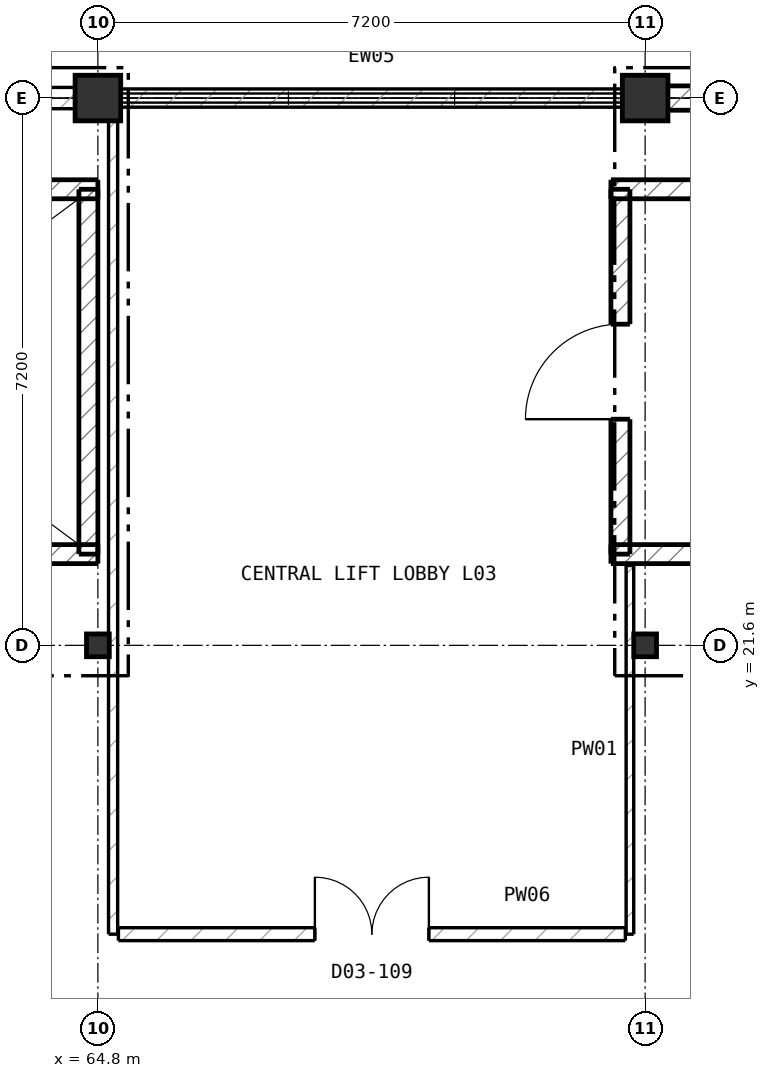
"""IFC4 building model, lengths in metres.
Left out: names, types, materials, properties, quantities, classifications, styles, units other than length and angle.
Written with IfcOpenShell. Run it as: python <this file> out.ifc"""

import sys

from ifc_helpers import new_model, si_unit, direction, frame, frame_2d, origin, origin_2d, place, context, subcontext, project, spatial, rectangle, hollow_rectangle, extrude, element, fill, save


model = new_model("IFC4")
c1 = context("Model", 3, precision=1e-05, world=origin(), true_north=direction((0.0, 1.0)))
c2 = subcontext(c1, "Body", "Model", "MODEL_VIEW")
j1 = project(units=[si_unit("LENGTHUNIT", "METRE"), si_unit("PLANEANGLEUNIT", "RADIAN")], contexts=[c1])
p1 = place(None, origin())
s1 = spatial("IfcSite", under=j1, at=p1, CompositionType="ELEMENT")
p2 = place(p1, origin())
s2 = spatial("IfcBuilding", under=s1, at=p2, CompositionType="ELEMENT")
p3 = place(p2, frame((0.0, 0.0, 16.0)))
s3 = spatial("IfcBuildingStorey", under=s2, at=p3, CompositionType="ELEMENT", Elevation=16.0)
p4 = place(p3, frame((64.8, 21.6, 0.0), z_axis=(0.0, 0.0, 1.0), x_axis=(1.0, 0.0, 0.0)))
e1 = element("IfcColumn", 1, at=p4, inside=s3, PredefinedType="COLUMN", context=c2, shape_type="SweptSolid", body=[
    extrude(hollow_rectangle(XDim=0.3, YDim=0.3, WallThickness=0.012, at=origin_2d()), origin(), (0.0, 0.0, 1.0), 4.4),
])
p5 = place(p3, frame((64.8, 28.8, 0.0), z_axis=(0.0, 0.0, 1.0), x_axis=(1.0, 0.0, 0.0)))
e2 = element("IfcColumn", 2, at=p5, inside=s3, PredefinedType="COLUMN", context=c2, shape_type="SweptSolid", body=[
    extrude(rectangle(XDim=0.6, YDim=0.6, at=origin_2d()), origin(), (0.0, 0.0, 1.0), 4.4),
])
p6 = place(p3, frame((72.0, 21.6, 0.0), z_axis=(0.0, 0.0, 1.0), x_axis=(1.0, 0.0, 0.0)))
e3 = element("IfcColumn", 3, at=p6, inside=s3, PredefinedType="COLUMN", context=c2, shape_type="SweptSolid", body=[
    extrude(hollow_rectangle(XDim=0.3, YDim=0.3, WallThickness=0.012, at=origin_2d()), origin(), (0.0, 0.0, 1.0), 4.4),
])
p7 = place(p3, frame((72.0, 28.8, 0.0), z_axis=(0.0, 0.0, 1.0), x_axis=(1.0, 0.0, 0.0)))
e4 = element("IfcColumn", 4, at=p7, inside=s3, PredefinedType="COLUMN", context=c2, shape_type="SweptSolid", body=[
    extrude(rectangle(XDim=0.6, YDim=0.6, at=origin_2d()), origin(), (0.0, 0.0, 1.0), 4.4),
])
p8 = place(p3, frame((57.885, 28.8, 0.0), z_axis=(0.0, 0.0, 1.0), x_axis=(1.0, 0.0, 0.0)))
e5 = element("IfcWall", 5, at=p8, inside=s3, PredefinedType="SOLIDWALL", context=c2, shape_type="SweptSolid", body=[
    extrude(rectangle(XDim=6.63, YDim=0.28, at=frame_2d((3.315, 0.0))), origin(), (0.0, 0.0, 1.0), 4.12),
])
p9 = place(p8, frame((1.715, 0.0, 2.15)))
e6 = element("IfcOpeningElement", 6, at=p9, cuts=e5, PredefinedType="OPENING", context=c2, shape_type="SweptSolid", body=[
    extrude(rectangle(XDim=3.2, YDim=1.2, at=frame_2d((1.6, 0.6))), frame((0.0, 0.15, 0.0), z_axis=(0.0, -1.0, 0.0), x_axis=(1.0, 0.0, 0.0)), (0.0, 0.0, 1.0), 0.3),
])
p10 = place(p3, frame((65.085, 28.8, 0.0), z_axis=(0.0, 0.0, 1.0), x_axis=(1.0, 0.0, 0.0)))
e7 = element("IfcWall", 7, at=p10, inside=s3, PredefinedType="SOLIDWALL", context=c2, shape_type="SweptSolid", body=[
    extrude(rectangle(XDim=6.63, YDim=0.24, at=frame_2d((3.315, 0.0))), origin(), (0.0, 0.0, 1.0), 0.9),
])
p11 = place(p3, frame((72.285, 28.8, 0.0), z_axis=(0.0, 0.0, 1.0), x_axis=(1.0, 0.0, 0.0)))
e8 = element("IfcWall", 8, at=p11, inside=s3, PredefinedType="SOLIDWALL", context=c2, shape_type="SweptSolid", body=[
    extrude(rectangle(XDim=6.63, YDim=0.32, at=frame_2d((3.315, 0.0))), origin(), (0.0, 0.0, 1.0), 4.4),
])
p12 = place(p3, frame((57.15, 27.6, 0.0), z_axis=(0.0, 0.0, 1.0), x_axis=(1.0, 0.0, 0.0)))
e9 = element("IfcWall", 9, at=p12, inside=s3, PredefinedType="SHEAR", context=c2, shape_type="SweptSolid", body=[
    extrude(rectangle(XDim=7.65, YDim=0.25, at=frame_2d((3.825, 0.0))), origin(), (0.0, 0.0, 1.0), 4.4),
])
p13 = place(p3, frame((64.675, 27.6, 0.0), z_axis=(0.0, 0.0, 1.0), x_axis=(0.0, -1.0, 0.0)))
e10 = element("IfcWall", 10, at=p13, inside=s3, PredefinedType="SHEAR", context=c2, shape_type="SweptSolid", body=[
    extrude(rectangle(XDim=4.8, YDim=0.25, at=frame_2d((2.4, 0.0))), origin(), (0.0, 0.0, 1.0), 4.4),
])
p14 = place(p3, frame((64.8, 22.8, 0.0), z_axis=(0.0, 0.0, 1.0), x_axis=(-1.0, 0.0, 0.0)))
e11 = element("IfcWall", 11, at=p14, inside=s3, PredefinedType="SHEAR", context=c2, shape_type="SweptSolid", body=[
    extrude(rectangle(XDim=7.65, YDim=0.25, at=frame_2d((3.825, 0.0))), origin(), (0.0, 0.0, 1.0), 4.4),
])
p15 = place(p3, frame((71.675, 22.8, 0.0), z_axis=(0.0, 0.0, 1.0), x_axis=(0.0, 1.0, 0.0)))
e12 = element("IfcWall", 12, at=p15, inside=s3, PredefinedType="SHEAR", context=c2, shape_type="SweptSolid", body=[
    extrude(rectangle(XDim=4.8, YDim=0.25, at=frame_2d((2.4, 0.0))), origin(), (0.0, 0.0, 1.0), 4.4),
])
p16 = place(p15, frame((1.775, 0.0, 0.0)))
e13 = element("IfcOpeningElement", 13, at=p16, cuts=e12, PredefinedType="OPENING", context=c2, shape_type="SweptSolid", body=[
    extrude(rectangle(XDim=1.25, YDim=2.2, at=frame_2d((0.625, 1.1))), frame((0.0, 0.135, 0.0), z_axis=(0.0, -1.0, 0.0), x_axis=(1.0, 0.0, 0.0)), (0.0, 0.0, 1.0), 0.27),
])
for number, where, z_axis, x_axis in (
    (14, (71.55, 27.6, 0.0), (0.0, 0.0, 1.0), (1.0, 0.0, 0.0)),
    (15, (79.2, 22.8, 0.0), (0.0, 0.0, 1.0), (-1.0, 0.0, 0.0)),
):
    element("IfcWall", number, at=place(p3, frame(where, z_axis=z_axis, x_axis=x_axis)), inside=s3, PredefinedType="SHEAR", context=c2, shape_type="SweptSolid", body=[
        extrude(rectangle(XDim=7.65, YDim=0.25, at=frame_2d((3.825, 0.0))), origin(), (0.0, 0.0, 1.0), 4.4),
    ])
p17 = place(p3, frame((65.0, 17.8, 0.0), z_axis=(0.0, 0.0, 1.0), x_axis=(0.0, 1.0, 0.0)))
e16 = element("IfcWall", 16, at=p17, inside=s3, PredefinedType="PARTITIONING", context=c2, shape_type="SweptSolid", body=[
    extrude(rectangle(XDim=10.7, YDim=0.12, at=frame_2d((5.35, 0.0))), origin(), (0.0, 0.0, 1.0), 4.12),
])
p18 = place(p3, frame((71.8, 17.8, 0.0), z_axis=(0.0, 0.0, 1.0), x_axis=(0.0, 1.0, 0.0)))
e17 = element("IfcWall", 17, at=p18, inside=s3, PredefinedType="PARTITIONING", context=c2, shape_type="SweptSolid", body=[
    extrude(rectangle(XDim=4.85, YDim=0.1, at=frame_2d((2.425, 0.0))), origin(), (0.0, 0.0, 1.0), 4.12),
])
p19 = place(p3, frame((65.07, 17.8, 0.0), z_axis=(0.0, 0.0, 1.0), x_axis=(1.0, 0.0, 0.0)))
e18 = element("IfcWall", 18, at=p19, inside=s3, PredefinedType="PARTITIONING", context=c2, shape_type="SweptSolid", body=[
    extrude(rectangle(XDim=6.67, YDim=0.17, at=frame_2d((3.335, 0.0))), origin(), (0.0, 0.0, 1.0), 4.12),
])
p20 = place(p19, frame((2.585, 0.0, 0.0)))
e19 = element("IfcOpeningElement", 19, at=p20, cuts=e18, PredefinedType="OPENING", context=c2, shape_type="SweptSolid", body=[
    extrude(rectangle(XDim=1.5, YDim=2.2, at=frame_2d((0.75, 1.1))), frame((0.0, 0.095, 0.0), z_axis=(0.0, -1.0, 0.0), x_axis=(1.0, 0.0, 0.0)), (0.0, 0.0, 1.0), 0.19),
])
p21 = place(p16, origin())
e20 = element("IfcDoor", 20, at=p21, inside=s3, OperationType="SINGLE_SWING_LEFT", PredefinedType="DOOR", context=c2, shape_type="SweptSolid", body=[
    extrude(rectangle(XDim=1.25, YDim=2.2, at=frame_2d((0.625, 1.1))), frame((0.0, 0.025, 0.0), z_axis=(0.0, -1.0, 0.0), x_axis=(1.0, 0.0, 0.0)), (0.0, 0.0, 1.0), 0.05),
])
fill(e13, e20)
p22 = place(p20, origin())
e21 = element("IfcDoor", 21, at=p22, inside=s3, OperationType="DOUBLE_DOOR_SINGLE_SWING", PredefinedType="DOOR", context=c2, shape_type="SweptSolid", body=[
    extrude(rectangle(XDim=1.5, YDim=2.2, at=frame_2d((0.75, 1.1))), frame((0.0, 0.025, 0.0), z_axis=(0.0, -1.0, 0.0), x_axis=(1.0, 0.0, 0.0)), (0.0, 0.0, 1.0), 0.05),
])
fill(e19, e21)
save(model, sys.argv[1])
